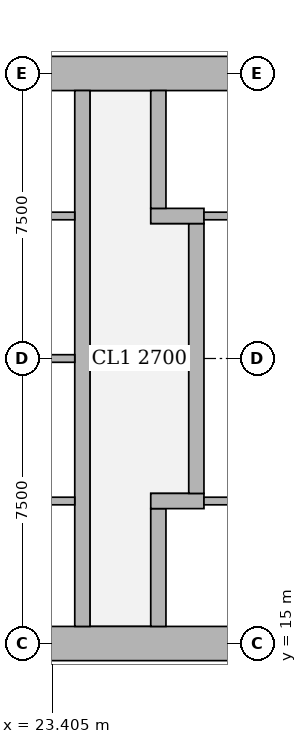
"""IFC4 building model, lengths in metres.
Left out: names, types, materials, properties, quantities, classifications, styles, units other than length and angle.
Written with IfcOpenShell. Run it as: python <this file> out.ifc"""

import sys

from ifc_helpers import new_model, si_unit, direction, frame, frame_2d, origin, place, context, subcontext, project, spatial, rectangle, extrude, element, fill, save


model = new_model("IFC4")
c1 = context("Model", 3, precision=1e-05, world=origin(), true_north=direction((0.0, 1.0)))
c2 = subcontext(c1, "Body", "Model", "MODEL_VIEW")
j1 = project(units=[si_unit("LENGTHUNIT", "METRE"), si_unit("PLANEANGLEUNIT", "RADIAN")], contexts=[c1])
p1 = place(None, origin())
s1 = spatial("IfcSite", under=j1, at=p1, CompositionType="ELEMENT")
p2 = place(p1, origin())
s2 = spatial("IfcBuilding", under=s1, at=p2, CompositionType="ELEMENT")
p3 = place(p2, frame((0.0, 0.0, 193.7)))
s3 = spatial("IfcBuildingStorey", under=s2, at=p3, CompositionType="ELEMENT", Elevation=193.7)
p4 = place(p3, frame((13.95, 15.0, 0.0), z_axis=(0.0, 0.0, 1.0), x_axis=(1.0, 0.0, 0.0)))
e1 = element("IfcWall", 1, at=p4, inside=s3, PredefinedType="SHEAR", context=c2, shape_type="SweptSolid", body=[
    extrude(rectangle(XDim=15.3, YDim=0.9, at=frame_2d((7.65, 0.0))), origin(), (0.0, 0.0, 1.0), 3.75),
])
p5 = place(p4, frame((4.45, 0.0, 0.0)))
e2 = element("IfcOpeningElement", 2, at=p5, cuts=e1, PredefinedType="OPENING", context=c2, shape_type="SweptSolid", body=[
    extrude(rectangle(XDim=1.8, YDim=2.1, at=frame_2d((0.9, 1.05))), frame((0.0, 0.46, 0.0), z_axis=(0.0, -1.0, 0.0), x_axis=(1.0, 0.0, 0.0)), (0.0, 0.0, 1.0), 0.92),
])
p6 = place(p4, frame((10.7, 0.0, 0.0)))
e3 = element("IfcOpeningElement", 3, at=p6, cuts=e1, PredefinedType="OPENING", context=c2, shape_type="SweptSolid", body=[
    extrude(rectangle(XDim=1.1, YDim=2.1, at=frame_2d((0.55, 1.05))), frame((0.0, 0.46, 0.0), z_axis=(0.0, -1.0, 0.0), x_axis=(1.0, 0.0, 0.0)), (0.0, 0.0, 1.0), 0.92),
])
p7 = place(p3, frame((13.95, 30.0, 0.0), z_axis=(0.0, 0.0, 1.0), x_axis=(1.0, 0.0, 0.0)))
e4 = element("IfcWall", 4, at=p7, inside=s3, PredefinedType="SHEAR", context=c2, shape_type="SweptSolid", body=[
    extrude(rectangle(XDim=15.3, YDim=0.9, at=frame_2d((7.65, 0.0))), origin(), (0.0, 0.0, 1.0), 3.75),
])
p8 = place(p7, frame((4.45, 0.0, 0.0)))
e5 = element("IfcOpeningElement", 5, at=p8, cuts=e4, PredefinedType="OPENING", context=c2, shape_type="SweptSolid", body=[
    extrude(rectangle(XDim=1.8, YDim=2.1, at=frame_2d((0.9, 1.05))), frame((0.0, 0.46, 0.0), z_axis=(0.0, -1.0, 0.0), x_axis=(1.0, 0.0, 0.0)), (0.0, 0.0, 1.0), 0.92),
])
p9 = place(p7, frame((10.7, 0.0, 0.0)))
e6 = element("IfcOpeningElement", 6, at=p9, cuts=e4, PredefinedType="OPENING", context=c2, shape_type="SweptSolid", body=[
    extrude(rectangle(XDim=1.1, YDim=2.1, at=frame_2d((0.55, 1.05))), frame((0.0, 0.46, 0.0), z_axis=(0.0, -1.0, 0.0), x_axis=(1.0, 0.0, 0.0)), (0.0, 0.0, 1.0), 0.92),
])
p10 = place(p3, frame((24.2, 15.45, 0.0), z_axis=(0.0, 0.0, 1.0), x_axis=(0.0, 1.0, 0.0)))
e7 = element("IfcWall", 7, at=p10, inside=s3, PredefinedType="SHEAR", context=c2, shape_type="SweptSolid", body=[
    extrude(rectangle(XDim=14.1, YDim=0.4, at=frame_2d((7.05, 0.0))), origin(), (0.0, 0.0, 1.0), 3.75),
])
p11 = place(p3, frame((26.2, 15.45, 0.0), z_axis=(0.0, 0.0, 1.0), x_axis=(0.0, 1.0, 0.0)))
e8 = element("IfcWall", 8, at=p11, inside=s3, PredefinedType="SHEAR", context=c2, shape_type="SweptSolid", body=[
    extrude(rectangle(XDim=3.1, YDim=0.4, at=frame_2d((1.55, 0.0))), origin(), (0.0, 0.0, 1.0), 3.75),
])
p12 = place(p11, frame((0.825, 0.0, 0.0)))
e9 = element("IfcOpeningElement", 9, at=p12, cuts=e8, PredefinedType="OPENING", context=c2, shape_type="SweptSolid", body=[
    extrude(rectangle(XDim=1.2, YDim=2.1, at=frame_2d((0.6, 1.05))), frame((0.0, 0.21, 0.0), z_axis=(0.0, -1.0, 0.0), x_axis=(1.0, 0.0, 0.0)), (0.0, 0.0, 1.0), 0.42),
])
p13 = place(p3, frame((26.0, 18.75, 0.0), z_axis=(0.0, 0.0, 1.0), x_axis=(1.0, 0.0, 0.0)))
e10 = element("IfcWall", 10, at=p13, inside=s3, PredefinedType="SHEAR", context=c2, shape_type="SweptSolid", body=[
    extrude(rectangle(XDim=1.4, YDim=0.4, at=frame_2d((0.7, 0.0))), origin(), (0.0, 0.0, 1.0), 3.75),
])
p14 = place(p3, frame((27.2, 18.95, 0.0), z_axis=(0.0, 0.0, 1.0), x_axis=(0.0, 1.0, 0.0)))
e11 = element("IfcWall", 11, at=p14, inside=s3, PredefinedType="SHEAR", context=c2, shape_type="SweptSolid", body=[
    extrude(rectangle(XDim=7.1, YDim=0.4, at=frame_2d((3.55, 0.0))), origin(), (0.0, 0.0, 1.0), 3.75),
])
p15 = place(p3, frame((26.0, 26.25, 0.0), z_axis=(0.0, 0.0, 1.0), x_axis=(1.0, 0.0, 0.0)))
e12 = element("IfcWall", 12, at=p15, inside=s3, PredefinedType="SHEAR", context=c2, shape_type="SweptSolid", body=[
    extrude(rectangle(XDim=1.4, YDim=0.4, at=frame_2d((0.7, 0.0))), origin(), (0.0, 0.0, 1.0), 3.75),
])
p16 = place(p3, frame((26.2, 26.45, 0.0), z_axis=(0.0, 0.0, 1.0), x_axis=(0.0, 1.0, 0.0)))
e13 = element("IfcWall", 13, at=p16, inside=s3, PredefinedType="SHEAR", context=c2, shape_type="SweptSolid", body=[
    extrude(rectangle(XDim=3.1, YDim=0.4, at=frame_2d((1.55, 0.0))), origin(), (0.0, 0.0, 1.0), 3.75),
])
p17 = place(p16, frame((1.075, 0.0, 0.0)))
e14 = element("IfcOpeningElement", 14, at=p17, cuts=e13, PredefinedType="OPENING", context=c2, shape_type="SweptSolid", body=[
    extrude(rectangle(XDim=1.2, YDim=2.1, at=frame_2d((0.6, 1.05))), frame((0.0, 0.21, 0.0), z_axis=(0.0, -1.0, 0.0), x_axis=(1.0, 0.0, 0.0)), (0.0, 0.0, 1.0), 0.42),
])
for number, where, z_axis, x_axis in (
    (15, (21.8, 18.75, 0.0), (0.0, 0.0, 1.0), (1.0, 0.0, 0.0)),
    (16, (21.8, 22.5, 0.0), (0.0, 0.0, 1.0), (1.0, 0.0, 0.0)),
    (17, (21.8, 26.25, 0.0), (0.0, 0.0, 1.0), (1.0, 0.0, 0.0)),
):
    element("IfcWall", number, at=place(p3, frame(where, z_axis=z_axis, x_axis=x_axis)), inside=s3, PredefinedType="SOLIDWALL", context=c2, shape_type="SweptSolid", body=[
        extrude(rectangle(XDim=2.2, YDim=0.2, at=frame_2d((1.1, 0.0))), origin(), (0.0, 0.0, 1.0), 3.5),
    ])
for number, where, z_axis, x_axis in (
    (18, (27.4, 18.75, 0.0), (0.0, 0.0, 1.0), (1.0, 0.0, 0.0)),
    (19, (27.4, 26.25, 0.0), (0.0, 0.0, 1.0), (1.0, 0.0, 0.0)),
):
    element("IfcWall", number, at=place(p3, frame(where, z_axis=z_axis, x_axis=x_axis)), inside=s3, PredefinedType="SOLIDWALL", context=c2, shape_type="SweptSolid", body=[
        extrude(rectangle(XDim=0.95, YDim=0.2, at=frame_2d((0.475, 0.0))), origin(), (0.0, 0.0, 1.0), 3.5),
    ])
p18 = place(p6, origin())
e20 = element("IfcDoor", 20, at=p18, inside=s3, OperationType="SINGLE_SWING_LEFT", PredefinedType="DOOR", context=c2, shape_type="SweptSolid", body=[
    extrude(rectangle(XDim=1.1, YDim=2.1, at=frame_2d((0.55, 1.05))), frame((0.0, 0.025, 0.0), z_axis=(0.0, -1.0, 0.0), x_axis=(1.0, 0.0, 0.0)), (0.0, 0.0, 1.0), 0.05),
])
fill(e3, e20)
p19 = place(p9, origin())
e21 = element("IfcDoor", 21, at=p19, inside=s3, OperationType="SINGLE_SWING_LEFT", PredefinedType="DOOR", context=c2, shape_type="SweptSolid", body=[
    extrude(rectangle(XDim=1.1, YDim=2.1, at=frame_2d((0.55, 1.05))), frame((0.0, 0.025, 0.0), z_axis=(0.0, -1.0, 0.0), x_axis=(1.0, 0.0, 0.0)), (0.0, 0.0, 1.0), 0.05),
])
fill(e6, e21)
p20 = place(p12, origin())
e22 = element("IfcDoor", 22, at=p20, inside=s3, OperationType="DOUBLE_DOOR_SLIDING", PredefinedType="DOOR", context=c2, shape_type="SweptSolid", body=[
    extrude(rectangle(XDim=1.2, YDim=2.1, at=frame_2d((0.6, 1.05))), frame((0.0, 0.025, 0.0), z_axis=(0.0, -1.0, 0.0), x_axis=(1.0, 0.0, 0.0)), (0.0, 0.0, 1.0), 0.05),
])
fill(e9, e22)
p21 = place(p17, origin())
e23 = element("IfcDoor", 23, at=p21, inside=s3, OperationType="DOUBLE_DOOR_SLIDING", PredefinedType="DOOR", context=c2, shape_type="SweptSolid", body=[
    extrude(rectangle(XDim=1.2, YDim=2.1, at=frame_2d((0.6, 1.05))), frame((0.0, 0.025, 0.0), z_axis=(0.0, -1.0, 0.0), x_axis=(1.0, 0.0, 0.0)), (0.0, 0.0, 1.0), 0.05),
])
fill(e14, e23)
save(model, sys.argv[1])
